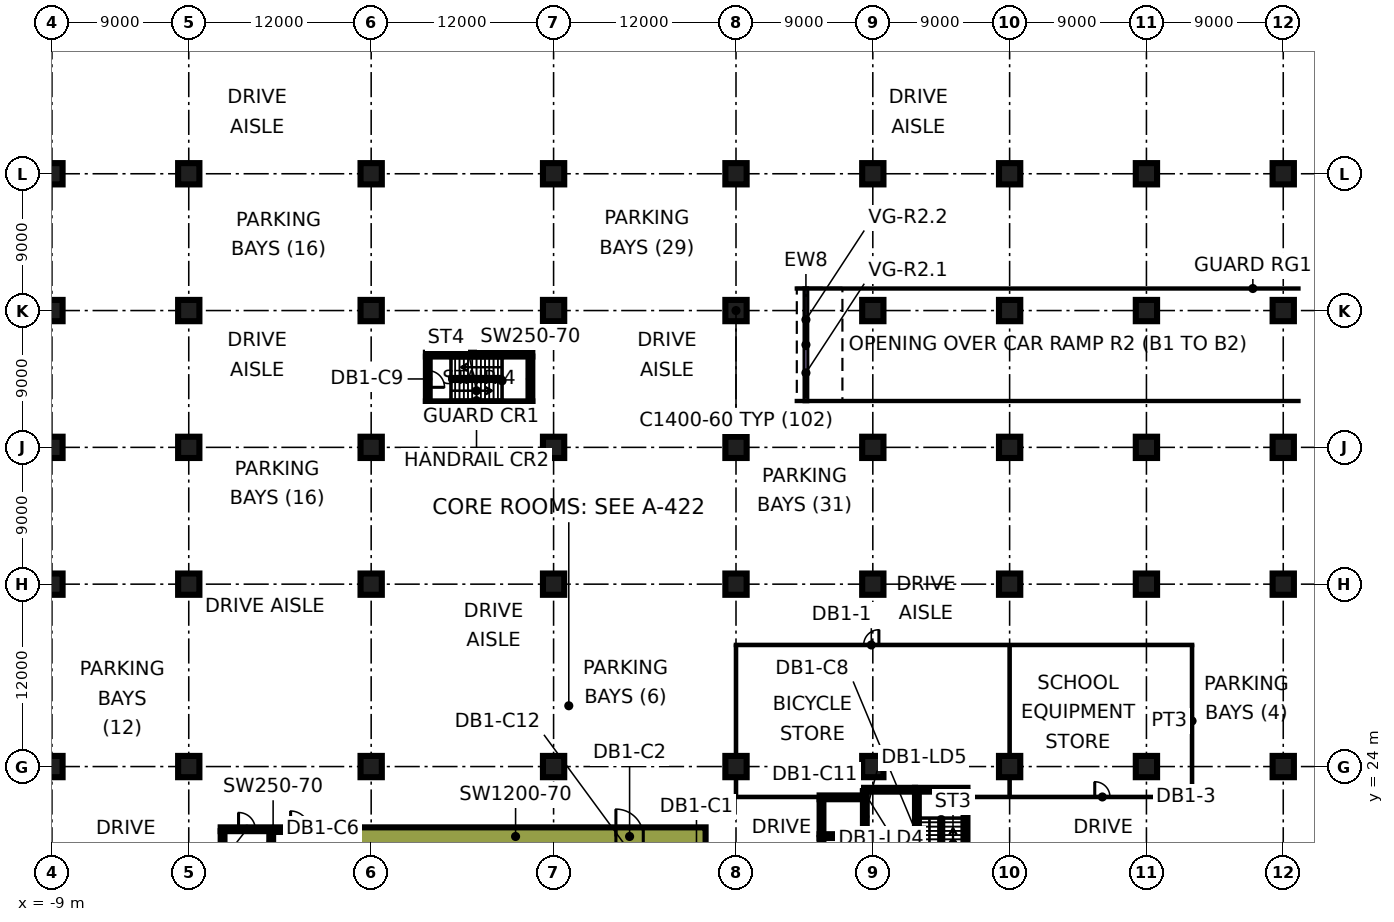
"""IFC4 building model, lengths in metres.
Left out: names, types, materials, properties, quantities, classifications, styles, units other than length and angle.
Written with IfcOpenShell. Run it as: python <this file> out.ifc"""

import sys

from ifc_helpers import new_model, si_unit, direction, frame, frame_2d, origin, origin_2d, place, context, subcontext, project, spatial, rectangle, extrude, element, fill, save


model = new_model("IFC4")
c1 = context("Model", 3, precision=1e-05, world=origin(), true_north=direction((0.0, 1.0)))
c2 = subcontext(c1, "Body", "Model", "MODEL_VIEW")
j1 = project(units=[si_unit("LENGTHUNIT", "METRE"), si_unit("PLANEANGLEUNIT", "RADIAN")], contexts=[c1])
p1 = place(None, origin())
s1 = spatial("IfcSite", under=j1, at=p1, CompositionType="ELEMENT")
p2 = place(p1, origin())
s2 = spatial("IfcBuilding", under=s1, at=p2, CompositionType="ELEMENT")
p3 = place(p2, frame((0.0, 0.0, -4.5)))
s3 = spatial("IfcBuildingStorey", under=s2, at=p3, CompositionType="ELEMENT", Elevation=-4.5)
for number, where, z_axis, x_axis in (
    (1, (-9.0, 24.0, 0.0), (0.0, 0.0, 1.0), (1.0, 0.0, 0.0)),
    (2, (-9.0, 36.0, 0.0), (0.0, 0.0, 1.0), (1.0, 0.0, 0.0)),
    (3, (-9.0, 45.0, 0.0), (0.0, 0.0, 1.0), (1.0, 0.0, 0.0)),
    (4, (-9.0, 54.0, 0.0), (0.0, 0.0, 1.0), (1.0, 0.0, 0.0)),
    (5, (-9.0, 63.0, 0.0), (0.0, 0.0, 1.0), (1.0, 0.0, 0.0)),
    (6, (0.0, 24.0, 0.0), (0.0, 0.0, 1.0), (1.0, 0.0, 0.0)),
    (7, (0.0, 36.0, 0.0), (0.0, 0.0, 1.0), (1.0, 0.0, 0.0)),
    (8, (0.0, 45.0, 0.0), (0.0, 0.0, 1.0), (1.0, 0.0, 0.0)),
    (9, (0.0, 54.0, 0.0), (0.0, 0.0, 1.0), (1.0, 0.0, 0.0)),
    (10, (0.0, 63.0, 0.0), (0.0, 0.0, 1.0), (1.0, 0.0, 0.0)),
    (11, (12.0, 24.0, 0.0), (0.0, 0.0, 1.0), (1.0, 0.0, 0.0)),
    (12, (12.0, 36.0, 0.0), (0.0, 0.0, 1.0), (1.0, 0.0, 0.0)),
    (13, (12.0, 45.0, 0.0), (0.0, 0.0, 1.0), (1.0, 0.0, 0.0)),
    (14, (12.0, 54.0, 0.0), (0.0, 0.0, 1.0), (1.0, 0.0, 0.0)),
    (15, (12.0, 63.0, 0.0), (0.0, 0.0, 1.0), (1.0, 0.0, 0.0)),
    (16, (24.0, 24.0, 0.0), (0.0, 0.0, 1.0), (1.0, 0.0, 0.0)),
    (17, (24.0, 36.0, 0.0), (0.0, 0.0, 1.0), (1.0, 0.0, 0.0)),
    (18, (24.0, 45.0, 0.0), (0.0, 0.0, 1.0), (1.0, 0.0, 0.0)),
    (19, (24.0, 54.0, 0.0), (0.0, 0.0, 1.0), (1.0, 0.0, 0.0)),
    (20, (24.0, 63.0, 0.0), (0.0, 0.0, 1.0), (1.0, 0.0, 0.0)),
    (21, (36.0, 24.0, 0.0), (0.0, 0.0, 1.0), (1.0, 0.0, 0.0)),
    (22, (36.0, 36.0, 0.0), (0.0, 0.0, 1.0), (1.0, 0.0, 0.0)),
    (23, (36.0, 45.0, 0.0), (0.0, 0.0, 1.0), (1.0, 0.0, 0.0)),
    (24, (36.0, 54.0, 0.0), (0.0, 0.0, 1.0), (1.0, 0.0, 0.0)),
    (25, (36.0, 63.0, 0.0), (0.0, 0.0, 1.0), (1.0, 0.0, 0.0)),
    (26, (45.0, 24.0, 0.0), (0.0, 0.0, 1.0), (1.0, 0.0, 0.0)),
    (27, (45.0, 36.0, 0.0), (0.0, 0.0, 1.0), (1.0, 0.0, 0.0)),
    (28, (45.0, 45.0, 0.0), (0.0, 0.0, 1.0), (1.0, 0.0, 0.0)),
    (29, (45.0, 54.0, 0.0), (0.0, 0.0, 1.0), (1.0, 0.0, 0.0)),
    (30, (45.0, 63.0, 0.0), (0.0, 0.0, 1.0), (1.0, 0.0, 0.0)),
    (31, (54.0, 24.0, 0.0), (0.0, 0.0, 1.0), (1.0, 0.0, 0.0)),
    (32, (54.0, 36.0, 0.0), (0.0, 0.0, 1.0), (1.0, 0.0, 0.0)),
    (33, (54.0, 45.0, 0.0), (0.0, 0.0, 1.0), (1.0, 0.0, 0.0)),
    (34, (54.0, 54.0, 0.0), (0.0, 0.0, 1.0), (1.0, 0.0, 0.0)),
    (35, (54.0, 63.0, 0.0), (0.0, 0.0, 1.0), (1.0, 0.0, 0.0)),
    (36, (63.0, 24.0, 0.0), (0.0, 0.0, 1.0), (1.0, 0.0, 0.0)),
    (37, (63.0, 36.0, 0.0), (0.0, 0.0, 1.0), (1.0, 0.0, 0.0)),
    (38, (63.0, 45.0, 0.0), (0.0, 0.0, 1.0), (1.0, 0.0, 0.0)),
    (39, (63.0, 54.0, 0.0), (0.0, 0.0, 1.0), (1.0, 0.0, 0.0)),
    (40, (63.0, 63.0, 0.0), (0.0, 0.0, 1.0), (1.0, 0.0, 0.0)),
    (41, (72.0, 24.0, 0.0), (0.0, 0.0, 1.0), (1.0, 0.0, 0.0)),
    (42, (72.0, 36.0, 0.0), (0.0, 0.0, 1.0), (1.0, 0.0, 0.0)),
    (43, (72.0, 45.0, 0.0), (0.0, 0.0, 1.0), (1.0, 0.0, 0.0)),
    (44, (72.0, 54.0, 0.0), (0.0, 0.0, 1.0), (1.0, 0.0, 0.0)),
    (45, (72.0, 63.0, 0.0), (0.0, 0.0, 1.0), (1.0, 0.0, 0.0)),
):
    element("IfcColumn", number, at=place(p3, frame(where, z_axis=z_axis, x_axis=x_axis)), inside=s3, PredefinedType="COLUMN", context=c2, shape_type="SweptSolid", body=[
        extrude(rectangle(XDim=1.4, YDim=1.4, at=origin_2d()), origin(), (0.0, 0.0, 1.0), 4.5),
    ])
p4 = place(p3, frame((9.0, 19.4, 0.0), z_axis=(0.0, 0.0, 1.0), x_axis=(1.0, 0.0, 0.0)))
e46 = element("IfcWall", 46, at=p4, inside=s3, PredefinedType="SHEAR", context=c2, shape_type="SweptSolid", body=[
    extrude(rectangle(XDim=25.0, YDim=1.2, at=frame_2d((12.5, 0.0))), origin(), (0.0, 0.0, 1.0), 4.5),
])
p5 = place(p4, frame((19.1, 0.0, 0.0)))
e47 = element("IfcOpeningElement", 47, at=p5, cuts=e46, PredefinedType="OPENING", context=c2, shape_type="SweptSolid", body=[
    extrude(rectangle(XDim=1.8, YDim=2.4, at=frame_2d((0.9, 1.2))), frame((0.0, 0.61, 0.0), z_axis=(0.0, -1.0, 0.0), x_axis=(1.0, 0.0, 0.0)), (0.0, 0.0, 1.0), 1.22),
])
p6 = place(p3, frame((2.1, 19.875, 0.0), z_axis=(0.0, 0.0, 1.0), x_axis=(1.0, 0.0, 0.0)))
e48 = element("IfcWall", 48, at=p6, inside=s3, PredefinedType="SHEAR", context=c2, shape_type="SweptSolid", body=[
    extrude(rectangle(XDim=6.9, YDim=0.25, at=frame_2d((3.45, 0.0))), origin(), (0.0, 0.0, 1.0), 4.5),
])
p7 = place(p6, frame((1.175, 0.0, 0.0)))
e49 = element("IfcOpeningElement", 49, at=p7, cuts=e48, PredefinedType="OPENING", context=c2, shape_type="SweptSolid", body=[
    extrude(rectangle(XDim=1.1, YDim=2.2, at=frame_2d((0.55, 1.1))), frame((0.0, 0.135, 0.0), z_axis=(0.0, -1.0, 0.0), x_axis=(1.0, 0.0, 0.0)), (0.0, 0.0, 1.0), 0.27),
])
p8 = place(p6, frame((4.6, 0.0, 0.0)))
e50 = element("IfcOpeningElement", 50, at=p8, cuts=e48, PredefinedType="OPENING", context=c2, shape_type="SweptSolid", body=[
    extrude(rectangle(XDim=1.2, YDim=2.2, at=frame_2d((0.6, 1.1))), frame((0.0, 0.135, 0.0), z_axis=(0.0, -1.0, 0.0), x_axis=(1.0, 0.0, 0.0)), (0.0, 0.0, 1.0), 0.27),
])
p9 = place(p3, frame((2.225, 13.25, 0.0), z_axis=(0.0, 0.0, 1.0), x_axis=(0.0, 1.0, 0.0)))
e51 = element("IfcWall", 51, at=p9, inside=s3, PredefinedType="SHEAR", context=c2, shape_type="SweptSolid", body=[
    extrude(rectangle(XDim=6.5, YDim=0.25, at=frame_2d((3.25, 0.0))), origin(), (0.0, 0.0, 1.0), 4.5),
])
p10 = place(p3, frame((5.425, 13.25, 0.0), z_axis=(0.0, 0.0, 1.0), x_axis=(0.0, 1.0, 0.0)))
e52 = element("IfcWall", 52, at=p10, inside=s3, PredefinedType="SHEAR", context=c2, shape_type="SweptSolid", body=[
    extrude(rectangle(XDim=6.5, YDim=0.25, at=frame_2d((3.25, 0.0))), origin(), (0.0, 0.0, 1.0), 4.5),
])
p11 = place(p10, frame((5.25, 0.0, 0.0)))
e53 = element("IfcOpeningElement", 53, at=p11, cuts=e52, PredefinedType="OPENING", context=c2, shape_type="SweptSolid", body=[
    extrude(rectangle(XDim=1.1, YDim=2.2, at=frame_2d((0.55, 1.1))), frame((0.0, 0.135, 0.0), z_axis=(0.0, -1.0, 0.0), x_axis=(1.0, 0.0, 0.0)), (0.0, 0.0, 1.0), 0.27),
])
p12 = place(p3, frame((47.775, 22.475, 0.0), z_axis=(0.0, 0.0, 1.0), x_axis=(1.0, 0.0, 0.0)))
e54 = element("IfcWall", 54, at=p12, inside=s3, PredefinedType="SHEAR", context=c2, shape_type="SweptSolid", body=[
    extrude(rectangle(XDim=3.45, YDim=0.25, at=frame_2d((1.725, 0.0))), origin(), (0.0, 0.0, 1.0), 4.5),
])
p13 = place(p3, frame((47.9, 15.85, 0.0), z_axis=(0.0, 0.0, 1.0), x_axis=(0.0, 1.0, 0.0)))
e55 = element("IfcWall", 55, at=p13, inside=s3, PredefinedType="SHEAR", context=c2, shape_type="SweptSolid", body=[
    extrude(rectangle(XDim=6.5, YDim=0.25, at=frame_2d((3.25, 0.0))), origin(), (0.0, 0.0, 1.0), 4.5),
])
p14 = place(p13, frame((0.35, 0.0, 0.0)))
e56 = element("IfcOpeningElement", 56, at=p14, cuts=e55, PredefinedType="OPENING", context=c2, shape_type="SweptSolid", body=[
    extrude(rectangle(XDim=1.1, YDim=2.2, at=frame_2d((0.55, 1.1))), frame((0.0, 0.135, 0.0), z_axis=(0.0, -1.0, 0.0), x_axis=(1.0, 0.0, 0.0)), (0.0, 0.0, 1.0), 0.27),
])
p15 = place(p3, frame((51.1, 15.85, 0.0), z_axis=(0.0, 0.0, 1.0), x_axis=(0.0, 1.0, 0.0)))
e57 = element("IfcWall", 57, at=p15, inside=s3, PredefinedType="SHEAR", context=c2, shape_type="SweptSolid", body=[
    extrude(rectangle(XDim=6.5, YDim=0.25, at=frame_2d((3.25, 0.0))), origin(), (0.0, 0.0, 1.0), 4.5),
])
for number, where, z_axis, x_axis in (
    (58, (15.6, 47.9, 0.0), (0.0, 0.0, 1.0), (1.0, 0.0, 0.0)),
    (59, (15.6, 51.1, 0.0), (0.0, 0.0, 1.0), (1.0, 0.0, 0.0)),
):
    element("IfcWall", number, at=place(p3, frame(where, z_axis=z_axis, x_axis=x_axis)), inside=s3, PredefinedType="SHEAR", context=c2, shape_type="SweptSolid", body=[
        extrude(rectangle(XDim=7.0, YDim=0.25, at=frame_2d((3.5, 0.0))), origin(), (0.0, 0.0, 1.0), 4.5),
    ])
p16 = place(p3, frame((15.725, 48.025, 0.0), z_axis=(0.0, 0.0, 1.0), x_axis=(0.0, 1.0, 0.0)))
e60 = element("IfcWall", 60, at=p16, inside=s3, PredefinedType="SHEAR", context=c2, shape_type="SweptSolid", body=[
    extrude(rectangle(XDim=2.95, YDim=0.25, at=frame_2d((1.475, 0.0))), origin(), (0.0, 0.0, 1.0), 4.5),
])
p17 = place(p16, frame((0.925, 0.0, 0.0)))
e61 = element("IfcOpeningElement", 61, at=p17, cuts=e60, PredefinedType="OPENING", context=c2, shape_type="SweptSolid", body=[
    extrude(rectangle(XDim=1.1, YDim=2.2, at=frame_2d((0.55, 1.1))), frame((0.0, 0.135, 0.0), z_axis=(0.0, -1.0, 0.0), x_axis=(1.0, 0.0, 0.0)), (0.0, 0.0, 1.0), 0.27),
])
p18 = place(p3, frame((22.475, 48.025, 0.0), z_axis=(0.0, 0.0, 1.0), x_axis=(0.0, 1.0, 0.0)))
e62 = element("IfcWall", 62, at=p18, inside=s3, PredefinedType="SHEAR", context=c2, shape_type="SweptSolid", body=[
    extrude(rectangle(XDim=2.95, YDim=0.25, at=frame_2d((1.475, 0.0))), origin(), (0.0, 0.0, 1.0), 4.5),
])
p19 = place(p3, frame((44.35, 22.475, 0.0), z_axis=(0.0, 0.0, 1.0), x_axis=(1.0, 0.0, 0.0)))
e63 = element("IfcWall", 63, at=p19, inside=s3, PredefinedType="SHEAR", context=c2, shape_type="SweptSolid", body=[
    extrude(rectangle(XDim=3.425, YDim=0.25, at=frame_2d((1.712, 0.0))), origin(), (0.0, 0.0, 1.0), 4.5),
])
p20 = place(p3, frame((44.475, 15.85, 0.0), z_axis=(0.0, 0.0, 1.0), x_axis=(0.0, 1.0, 0.0)))
e64 = element("IfcWall", 64, at=p20, inside=s3, PredefinedType="SHEAR", context=c2, shape_type="SweptSolid", body=[
    extrude(rectangle(XDim=6.5, YDim=0.25, at=frame_2d((3.25, 0.0))), origin(), (0.0, 0.0, 1.0), 4.5),
])
p21 = place(p20, frame((1.75, 0.0, 0.0)))
e65 = element("IfcOpeningElement", 65, at=p21, cuts=e64, PredefinedType="OPENING", context=c2, shape_type="SweptSolid", body=[
    extrude(rectangle(XDim=1.1, YDim=2.2, at=frame_2d((0.55, 1.1))), frame((0.0, 0.135, 0.0), z_axis=(0.0, -1.0, 0.0), x_axis=(1.0, 0.0, 0.0)), (0.0, 0.0, 1.0), 0.27),
])
p22 = place(p20, frame((4.3, 0.0, 0.0)))
e66 = element("IfcOpeningElement", 66, at=p22, cuts=e64, PredefinedType="OPENING", context=c2, shape_type="SweptSolid", body=[
    extrude(rectangle(XDim=1.1, YDim=2.2, at=frame_2d((0.55, 1.1))), frame((0.0, 0.135, 0.0), z_axis=(0.0, -1.0, 0.0), x_axis=(1.0, 0.0, 0.0)), (0.0, 0.0, 1.0), 0.27),
])
for number, where, z_axis, x_axis in (
    (67, (41.5, 19.425, 0.0), (0.0, 0.0, 1.0), (1.0, 0.0, 0.0)),
    (68, (41.5, 21.975, 0.0), (0.0, 0.0, 1.0), (1.0, 0.0, 0.0)),
):
    element("IfcWall", number, at=place(p3, frame(where, z_axis=z_axis, x_axis=x_axis)), inside=s3, PredefinedType="SHEAR", context=c2, shape_type="SweptSolid", body=[
        extrude(rectangle(XDim=2.85, YDim=0.25, at=frame_2d((1.425, 0.0))), origin(), (0.0, 0.0, 1.0), 4.5),
    ])
for number, where, z_axis, x_axis in (
    (69, (41.625, 17.0, 0.0), (0.0, 0.0, 1.0), (0.0, 1.0, 0.0)),
    (70, (41.625, 19.55, 0.0), (0.0, 0.0, 1.0), (0.0, 1.0, 0.0)),
):
    element("IfcWall", number, at=place(p3, frame(where, z_axis=z_axis, x_axis=x_axis)), inside=s3, PredefinedType="SHEAR", context=c2, shape_type="SweptSolid", body=[
        extrude(rectangle(XDim=2.3, YDim=0.25, at=frame_2d((1.15, 0.0))), origin(), (0.0, 0.0, 1.0), 4.5),
    ])
p23 = place(p3, frame((-6.294, 83.717, 0.0), z_axis=(0.0, 0.0, 1.0), x_axis=(-0.707112814855, -0.707100747466, 0.0)))
e71 = element("IfcWall", 71, at=p23, inside=s3, PredefinedType="SOLIDWALL", context=c2, shape_type="SweptSolid", body=[
    extrude(rectangle(XDim=20.231, YDim=0.8, at=frame_2d((10.116, 0.0))), origin(), (0.0, 0.0, 1.0), 4.5),
])
p24 = place(p3, frame((40.6, 48.0, -0.05), z_axis=(0.0, 0.0, 1.0), x_axis=(0.0, 1.0, 0.0)))
e72 = element("IfcWall", 72, at=p24, inside=s3, PredefinedType="SOLIDWALL", context=c2, shape_type="SweptSolid", body=[
    extrude(rectangle(XDim=7.5, YDim=0.25, at=frame_2d((3.75, 0.0))), origin(), (0.0, 0.0, 1.0), 2.7),
])
p25 = place(p24, frame((0.3, 0.0, 0.0)))
e73 = element("IfcOpeningElement", 73, at=p25, cuts=e72, PredefinedType="OPENING", context=c2, shape_type="SweptSolid", body=[
    extrude(rectangle(XDim=3.2, YDim=2.4, at=frame_2d((1.6, 1.2))), frame((0.0, 0.135, 0.0), z_axis=(0.0, -1.0, 0.0), x_axis=(1.0, 0.0, 0.0)), (0.0, 0.0, 1.0), 0.27),
])
p26 = place(p24, frame((3.8, 0.0, 0.0)))
e74 = element("IfcOpeningElement", 74, at=p26, cuts=e72, PredefinedType="OPENING", context=c2, shape_type="SweptSolid", body=[
    extrude(rectangle(XDim=3.2, YDim=2.4, at=frame_2d((1.6, 1.2))), frame((0.0, 0.135, 0.0), z_axis=(0.0, -1.0, 0.0), x_axis=(1.0, 0.0, 0.0)), (0.0, 0.0, 1.0), 0.27),
])
p27 = place(p3, frame((35.95, 22.0, 0.0), z_axis=(0.0, 0.0, 1.0), x_axis=(1.0, 0.0, 0.0)))
e75 = element("IfcWall", 75, at=p27, inside=s3, PredefinedType="PARTITIONING", context=c2, shape_type="SweptSolid", body=[
    extrude(rectangle(XDim=5.55, YDim=0.1, at=frame_2d((2.775, 0.0))), origin(), (0.0, 0.0, 1.0), 4.05),
])
p28 = place(p3, frame((35.95, 32.0, 0.0), z_axis=(0.0, 0.0, 1.0), x_axis=(1.0, 0.0, 0.0)))
e76 = element("IfcWall", 76, at=p28, inside=s3, PredefinedType="PARTITIONING", context=c2, shape_type="SweptSolid", body=[
    extrude(rectangle(XDim=30.1, YDim=0.1, at=frame_2d((15.05, 0.0))), origin(), (0.0, 0.0, 1.0), 4.05),
])
p29 = place(p28, frame((8.45, 0.0, 0.0)))
e77 = element("IfcOpeningElement", 77, at=p29, cuts=e76, PredefinedType="OPENING", context=c2, shape_type="SweptSolid", body=[
    extrude(rectangle(XDim=1.0, YDim=2.1, at=frame_2d((0.5, 1.05))), frame((0.0, 0.06, 0.0), z_axis=(0.0, -1.0, 0.0), x_axis=(1.0, 0.0, 0.0)), (0.0, 0.0, 1.0), 0.12),
])
p30 = place(p3, frame((36.0, 22.05, 0.0), z_axis=(0.0, 0.0, 1.0), x_axis=(0.0, 1.0, 0.0)))
e78 = element("IfcWall", 78, at=p30, inside=s3, PredefinedType="PARTITIONING", context=c2, shape_type="SweptSolid", body=[
    extrude(rectangle(XDim=1.251, YDim=0.1, at=frame_2d((0.625, 0.0))), origin(), (0.0, 0.0, 1.0), 4.05),
])
p31 = place(p3, frame((36.0, 24.699, 0.0), z_axis=(0.0, 0.0, 1.0), x_axis=(0.0, 1.0, 0.0)))
e79 = element("IfcWall", 79, at=p31, inside=s3, PredefinedType="PARTITIONING", context=c2, shape_type="SweptSolid", body=[
    extrude(rectangle(XDim=7.251, YDim=0.1, at=frame_2d((3.625, 0.0))), origin(), (0.0, 0.0, 1.0), 4.05),
])
p32 = place(p3, frame((51.225, 22.0, 0.0), z_axis=(0.0, 0.0, 1.0), x_axis=(1.0, 0.0, 0.0)))
e80 = element("IfcWall", 80, at=p32, inside=s3, PredefinedType="PARTITIONING", context=c2, shape_type="SweptSolid", body=[
    extrude(rectangle(XDim=14.825, YDim=0.1, at=frame_2d((7.413, 0.0))), origin(), (0.0, 0.0, 1.0), 4.05),
])
p33 = place(p32, frame((8.375, 0.0, 0.0)))
e81 = element("IfcOpeningElement", 81, at=p33, cuts=e80, PredefinedType="OPENING", context=c2, shape_type="SweptSolid", body=[
    extrude(rectangle(XDim=1.0, YDim=2.1, at=frame_2d((0.5, 1.05))), frame((0.0, 0.06, 0.0), z_axis=(0.0, -1.0, 0.0), x_axis=(1.0, 0.0, 0.0)), (0.0, 0.0, 1.0), 0.12),
])
p34 = place(p3, frame((54.0, 22.05, 0.0), z_axis=(0.0, 0.0, 1.0), x_axis=(0.0, 1.0, 0.0)))
e82 = element("IfcWall", 82, at=p34, inside=s3, PredefinedType="PARTITIONING", context=c2, shape_type="SweptSolid", body=[
    extrude(rectangle(XDim=1.251, YDim=0.1, at=frame_2d((0.625, 0.0))), origin(), (0.0, 0.0, 1.0), 4.05),
])
p35 = place(p3, frame((54.0, 24.699, 0.0), z_axis=(0.0, 0.0, 1.0), x_axis=(0.0, 1.0, 0.0)))
e83 = element("IfcWall", 83, at=p35, inside=s3, PredefinedType="PARTITIONING", context=c2, shape_type="SweptSolid", body=[
    extrude(rectangle(XDim=7.251, YDim=0.1, at=frame_2d((3.625, 0.0))), origin(), (0.0, 0.0, 1.0), 4.05),
])
p36 = place(p3, frame((66.0, 22.05, 0.0), z_axis=(0.0, 0.0, 1.0), x_axis=(0.0, 1.0, 0.0)))
e84 = element("IfcWall", 84, at=p36, inside=s3, PredefinedType="PARTITIONING", context=c2, shape_type="SweptSolid", body=[
    extrude(rectangle(XDim=9.9, YDim=0.1, at=frame_2d((4.95, 0.0))), origin(), (0.0, 0.0, 1.0), 4.05),
])
p37 = place(p5, origin())
e85 = element("IfcDoor", 85, at=p37, inside=s3, OperationType="DOUBLE_DOOR_SINGLE_SWING", PredefinedType="DOOR", context=c2, shape_type="SweptSolid", body=[
    extrude(rectangle(XDim=1.8, YDim=2.4, at=frame_2d((0.9, 1.2))), frame((0.0, 0.025, 0.0), z_axis=(0.0, -1.0, 0.0), x_axis=(1.0, 0.0, 0.0)), (0.0, 0.0, 1.0), 0.05),
])
fill(e47, e85)
p38 = place(p11, origin())
e86 = element("IfcDoor", 86, at=p38, inside=s3, OperationType="SINGLE_SWING_RIGHT", PredefinedType="DOOR", context=c2, shape_type="SweptSolid", body=[
    extrude(rectangle(XDim=1.1, YDim=2.2, at=frame_2d((0.55, 1.1))), frame((0.0, 0.025, 0.0), z_axis=(0.0, -1.0, 0.0), x_axis=(1.0, 0.0, 0.0)), (0.0, 0.0, 1.0), 0.05),
])
fill(e53, e86)
p39 = place(p7, origin())
e87 = element("IfcDoor", 87, at=p39, inside=s3, OperationType="SINGLE_SWING_LEFT", PredefinedType="DOOR", context=c2, shape_type="SweptSolid", body=[
    extrude(rectangle(XDim=1.1, YDim=2.2, at=frame_2d((0.55, 1.1))), frame((0.0, 0.025, 0.0), z_axis=(0.0, -1.0, 0.0), x_axis=(1.0, 0.0, 0.0)), (0.0, 0.0, 1.0), 0.05),
])
fill(e49, e87)
p40 = place(p8, origin())
e88 = element("IfcDoor", 88, at=p40, inside=s3, OperationType="SINGLE_SWING_LEFT", PredefinedType="DOOR", context=c2, shape_type="SweptSolid", body=[
    extrude(rectangle(XDim=1.2, YDim=2.2, at=frame_2d((0.6, 1.1))), frame((0.0, 0.025, 0.0), z_axis=(0.0, -1.0, 0.0), x_axis=(1.0, 0.0, 0.0)), (0.0, 0.0, 1.0), 0.05),
])
fill(e50, e88)
p41 = place(p17, frame((1.1, 0.0, 0.0), z_axis=(0.0, 0.0, 1.0), x_axis=(-1.0, 0.0, 0.0)))
e89 = element("IfcDoor", 89, at=p41, inside=s3, OperationType="SINGLE_SWING_LEFT", PredefinedType="DOOR", context=c2, shape_type="SweptSolid", body=[
    extrude(rectangle(XDim=1.1, YDim=2.2, at=frame_2d((0.55, 1.1))), frame((0.0, 0.025, 0.0), z_axis=(0.0, -1.0, 0.0), x_axis=(1.0, 0.0, 0.0)), (0.0, 0.0, 1.0), 0.05),
])
fill(e61, e89)
p42 = place(p22, origin())
e90 = element("IfcDoor", 90, at=p42, inside=s3, OperationType="DOUBLE_DOOR_SLIDING", PredefinedType="DOOR", context=c2, shape_type="SweptSolid", body=[
    extrude(rectangle(XDim=1.1, YDim=2.2, at=frame_2d((0.55, 1.1))), frame((0.0, 0.025, 0.0), z_axis=(0.0, -1.0, 0.0), x_axis=(1.0, 0.0, 0.0)), (0.0, 0.0, 1.0), 0.05),
])
fill(e66, e90)
p43 = place(p25, origin())
e91 = element("IfcDoor", 91, at=p43, inside=s3, OperationType="SLIDING_TO_LEFT", PredefinedType="GATE", context=c2, shape_type="SweptSolid", body=[
    extrude(rectangle(XDim=3.2, YDim=2.4, at=frame_2d((1.6, 1.2))), frame((0.0, 0.025, 0.0), z_axis=(0.0, -1.0, 0.0), x_axis=(1.0, 0.0, 0.0)), (0.0, 0.0, 1.0), 0.05),
])
fill(e73, e91)
p44 = place(p26, origin())
e92 = element("IfcDoor", 92, at=p44, inside=s3, OperationType="SLIDING_TO_LEFT", PredefinedType="GATE", context=c2, shape_type="SweptSolid", body=[
    extrude(rectangle(XDim=3.2, YDim=2.4, at=frame_2d((1.6, 1.2))), frame((0.0, 0.025, 0.0), z_axis=(0.0, -1.0, 0.0), x_axis=(1.0, 0.0, 0.0)), (0.0, 0.0, 1.0), 0.05),
])
fill(e74, e92)
p45 = place(p29, frame((1.0, 0.0, 0.0), z_axis=(0.0, 0.0, 1.0), x_axis=(-1.0, 0.0, 0.0)))
e93 = element("IfcDoor", 93, at=p45, inside=s3, OperationType="SINGLE_SWING_RIGHT", PredefinedType="DOOR", context=c2, shape_type="SweptSolid", body=[
    extrude(rectangle(XDim=1.0, YDim=2.1, at=frame_2d((0.5, 1.05))), frame((0.0, 0.025, 0.0), z_axis=(0.0, -1.0, 0.0), x_axis=(1.0, 0.0, 0.0)), (0.0, 0.0, 1.0), 0.05),
])
fill(e77, e93)
p46 = place(p33, origin())
e94 = element("IfcDoor", 94, at=p46, inside=s3, OperationType="SINGLE_SWING_LEFT", PredefinedType="DOOR", context=c2, shape_type="SweptSolid", body=[
    extrude(rectangle(XDim=1.0, YDim=2.1, at=frame_2d((0.5, 1.05))), frame((0.0, 0.025, 0.0), z_axis=(0.0, -1.0, 0.0), x_axis=(1.0, 0.0, 0.0)), (0.0, 0.0, 1.0), 0.05),
])
fill(e81, e94)
save(model, sys.argv[1])
